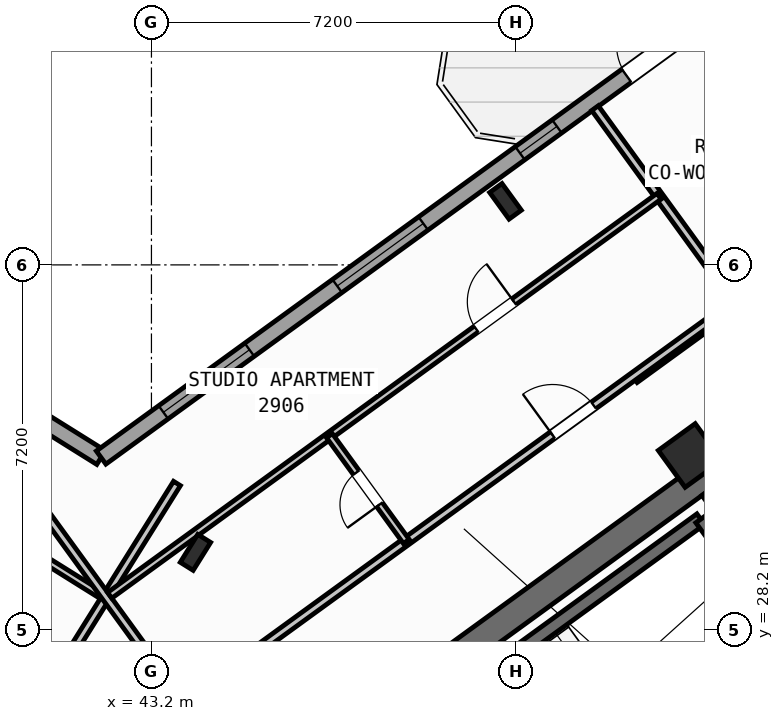
"""IFC4 building model, lengths in metres.
Left out: names, types, materials, properties, quantities, classifications, styles, units other than length and angle.
Written with IfcOpenShell. Run it as: python <this file> out.ifc"""

import sys

from ifc_helpers import new_model, si_unit, direction, frame, frame_2d, origin, origin_2d, place, context, subcontext, project, spatial, rectangle, hollow_rectangle, i_section, extrude, source, transform, mapped, element, fill, save


model = new_model("IFC4")
c1 = context("Model", 3, precision=1e-05, world=origin(), true_north=direction((0.0, 1.0)))
c2 = subcontext(c1, "Body", "Model", "MODEL_VIEW")
j1 = project(units=[si_unit("LENGTHUNIT", "METRE"), si_unit("PLANEANGLEUNIT", "RADIAN")], contexts=[c1])
p1 = place(None, origin())
s1 = spatial("IfcSite", under=j1, at=p1, CompositionType="ELEMENT")
p2 = place(p1, origin())
s2 = spatial("IfcBuilding", under=s1, at=p2, CompositionType="ELEMENT")
p3 = place(p2, frame((0.0, 0.0, 116.1)))
s3 = spatial("IfcBuildingStorey", under=s2, at=p3, CompositionType="ELEMENT", Elevation=116.1)
p4 = place(p3, frame((44.365, 24.142, 0.0), z_axis=(0.0, 0.0, 1.0), x_axis=(0.809024304885, 0.587775190107, 0.0)))
e1 = element("IfcWall", 1, at=p4, inside=s3, PredefinedType="SHEAR", context=c2, shape_type="SweptSolid", body=[
    extrude(rectangle(XDim=12.34, YDim=0.55, at=frame_2d((6.17, 0.0))), origin(), (0.0, 0.0, 1.0), 3.35),
])
p5 = place(p3, frame((58.064, 25.813, 0.0), z_axis=(0.0, 0.0, 1.0), x_axis=(-0.587764933797, 0.809031756236, 0.0)))
e2 = element("IfcWall", 2, at=p5, inside=s3, PredefinedType="SHEAR", context=c2, shape_type="SweptSolid", body=[
    extrude(rectangle(XDim=6.425, YDim=0.55, at=frame_2d((3.212, 0.0))), origin(), (0.0, 0.0, 1.0), 3.35),
])
m1 = source(origin(), c2, "Body", "SweptSolid", [
    extrude(i_section(OverallWidth=0.3, OverallDepth=0.65, WebThickness=0.016, FlangeThickness=0.031, at=origin_2d()), origin(), (0.0, 0.0, 1.0), 3.6),
])
p6 = place(p3, frame((44.068, 29.726, 0.0), z_axis=(0.0, 0.0, 1.0), x_axis=(-0.848048096156, 0.529919264233, 0.0)))
e3 = element("IfcColumn", 3, at=p6, inside=s3, PredefinedType="COLUMN", context=c2, shape_type="MappedRepresentation", body=[
    mapped(m1, transform((0.0, 0.0, 0.0), scale=1.0)),
])
m2 = source(origin(), c2, "Body", "SweptSolid", [
    extrude(hollow_rectangle(XDim=0.9, YDim=0.9, WallThickness=0.036, at=origin_2d()), origin(), (0.0, 0.0, 1.0), 3.6),
])
p7 = place(p3, frame((53.832, 31.638, 0.0), z_axis=(0.0, 0.0, 1.0), x_axis=(0.809016994375, 0.587785252292, 0.0)))
e4 = element("IfcColumn", 4, at=p7, inside=s3, PredefinedType="COLUMN", context=c2, shape_type="MappedRepresentation", body=[
    mapped(m2, transform((0.0, 0.0, 0.0), scale=1.0)),
])
p8 = place(p3, frame((50.188, 36.654, 0.0), z_axis=(0.0, 0.0, 1.0), x_axis=(0.809016994375, 0.587785252292, 0.0)))
e5 = element("IfcColumn", 5, at=p8, inside=s3, PredefinedType="COLUMN", context=c2, shape_type="MappedRepresentation", body=[
    mapped(m1, transform((0.0, 0.0, 0.0), scale=1.0)),
])
p9 = place(p3, frame((17.424, 47.083, 0.0), z_axis=(0.0, 0.0, 1.0), x_axis=(0.848049927979, -0.529916332693, 0.0)))
e6 = element("IfcWall", 6, at=p9, inside=s3, PredefinedType="STANDARD", context=c2, shape_type="SweptSolid", body=[
    extrude(rectangle(XDim=29.223, YDim=0.32, at=frame_2d((14.612, 0.0))), origin(), (0.0, 0.0, 1.0), 3.35),
])
p10 = place(p9, frame((8.839, 0.0, 0.0)))
e7 = element("IfcOpeningElement", 7, at=p10, cuts=e6, PredefinedType="OPENING", context=c2, shape_type="SweptSolid", body=[
    extrude(rectangle(XDim=1.05, YDim=2.15, at=frame_2d((0.525, 1.075))), frame((0.0, 0.17, 0.0), z_axis=(0.0, -1.0, 0.0), x_axis=(1.0, 0.0, 0.0)), (0.0, 0.0, 1.0), 0.34),
])
p11 = place(p9, frame((0.719, 0.0, 0.85)))
e8 = element("IfcOpeningElement", 8, at=p11, cuts=e6, PredefinedType="OPENING", context=c2, shape_type="SweptSolid", body=[
    extrude(rectangle(XDim=1.8, YDim=1.5, at=frame_2d((0.9, 0.75))), frame((0.0, 0.17, 0.0), z_axis=(0.0, -1.0, 0.0), x_axis=(1.0, 0.0, 0.0)), (0.0, 0.0, 1.0), 0.34),
])
p12 = place(p9, frame((3.981, 0.0, 0.85)))
e9 = element("IfcOpeningElement", 9, at=p12, cuts=e6, PredefinedType="OPENING", context=c2, shape_type="SweptSolid", body=[
    extrude(rectangle(XDim=1.5, YDim=1.5, at=frame_2d((0.75, 0.75))), frame((0.0, 0.17, 0.0), z_axis=(0.0, -1.0, 0.0), x_axis=(1.0, 0.0, 0.0)), (0.0, 0.0, 1.0), 0.34),
])
p13 = place(p9, frame((7.021, 0.0, 0.95)))
e10 = element("IfcOpeningElement", 10, at=p13, cuts=e6, PredefinedType="OPENING", context=c2, shape_type="SweptSolid", body=[
    extrude(rectangle(XDim=1.2, YDim=1.4, at=frame_2d((0.6, 0.7))), frame((0.0, 0.17, 0.0), z_axis=(0.0, -1.0, 0.0), x_axis=(1.0, 0.0, 0.0)), (0.0, 0.0, 1.0), 0.34),
])
p14 = place(p9, frame((14.471, 0.0, 0.95)))
e11 = element("IfcOpeningElement", 11, at=p14, cuts=e6, PredefinedType="OPENING", context=c2, shape_type="SweptSolid", body=[
    extrude(rectangle(XDim=1.2, YDim=1.4, at=frame_2d((0.6, 0.7))), frame((0.0, 0.17, 0.0), z_axis=(0.0, -1.0, 0.0), x_axis=(1.0, 0.0, 0.0)), (0.0, 0.0, 1.0), 0.34),
])
p15 = place(p9, frame((17.254, 0.0, 1.0)))
e12 = element("IfcOpeningElement", 12, at=p15, cuts=e6, PredefinedType="OPENING", context=c2, shape_type="SweptSolid", body=[
    extrude(rectangle(XDim=0.9, YDim=1.25, at=frame_2d((0.45, 0.625))), frame((0.0, 0.17, 0.0), z_axis=(0.0, -1.0, 0.0), x_axis=(1.0, 0.0, 0.0)), (0.0, 0.0, 1.0), 0.34),
])
p16 = place(p9, frame((20.764, 0.0, 0.8)))
e13 = element("IfcOpeningElement", 13, at=p16, cuts=e6, PredefinedType="OPENING", context=c2, shape_type="SweptSolid", body=[
    extrude(rectangle(XDim=2.1, YDim=1.55, at=frame_2d((1.05, 0.775))), frame((0.0, 0.17, 0.0), z_axis=(0.0, -1.0, 0.0), x_axis=(1.0, 0.0, 0.0)), (0.0, 0.0, 1.0), 0.34),
])
p17 = place(p9, frame((25.403, 0.0, 0.8)))
e14 = element("IfcOpeningElement", 14, at=p17, cuts=e6, PredefinedType="OPENING", context=c2, shape_type="SweptSolid", body=[
    extrude(rectangle(XDim=2.1, YDim=1.55, at=frame_2d((1.05, 0.775))), frame((0.0, 0.17, 0.0), z_axis=(0.0, -1.0, 0.0), x_axis=(1.0, 0.0, 0.0)), (0.0, 0.0, 1.0), 0.34),
])
p18 = place(p3, frame((42.207, 31.597, 0.0), z_axis=(0.0, 0.0, 1.0), x_axis=(0.809020333377, 0.587780656523, 0.0)))
e15 = element("IfcWall", 15, at=p18, inside=s3, PredefinedType="STANDARD", context=c2, shape_type="SweptSolid", body=[
    extrude(rectangle(XDim=15.223, YDim=0.32, at=frame_2d((7.611, 0.0))), origin(), (0.0, 0.0, 1.0), 3.35),
])
p19 = place(p18, frame((12.82, 0.0, 0.0)))
e16 = element("IfcOpeningElement", 16, at=p19, cuts=e15, PredefinedType="OPENING", context=c2, shape_type="SweptSolid", body=[
    extrude(rectangle(XDim=1.05, YDim=2.15, at=frame_2d((0.525, 1.075))), frame((0.0, 0.17, 0.0), z_axis=(0.0, -1.0, 0.0), x_axis=(1.0, 0.0, 0.0)), (0.0, 0.0, 1.0), 0.34),
])
p20 = place(p18, frame((1.52, 0.0, 0.8)))
e17 = element("IfcOpeningElement", 17, at=p20, cuts=e15, PredefinedType="OPENING", context=c2, shape_type="SweptSolid", body=[
    extrude(rectangle(XDim=2.1, YDim=1.55, at=frame_2d((1.05, 0.775))), frame((0.0, 0.17, 0.0), z_axis=(0.0, -1.0, 0.0), x_axis=(1.0, 0.0, 0.0)), (0.0, 0.0, 1.0), 0.34),
])
p21 = place(p18, frame((5.76, 0.0, 0.8)))
e18 = element("IfcOpeningElement", 18, at=p21, cuts=e15, PredefinedType="OPENING", context=c2, shape_type="SweptSolid", body=[
    extrude(rectangle(XDim=2.1, YDim=1.55, at=frame_2d((1.05, 0.775))), frame((0.0, 0.17, 0.0), z_axis=(0.0, -1.0, 0.0), x_axis=(1.0, 0.0, 0.0)), (0.0, 0.0, 1.0), 0.34),
])
p22 = place(p18, frame((10.219, 0.0, 1.0)))
e19 = element("IfcOpeningElement", 19, at=p22, cuts=e15, PredefinedType="OPENING", context=c2, shape_type="SweptSolid", body=[
    extrude(rectangle(XDim=0.9, YDim=1.25, at=frame_2d((0.45, 0.625))), frame((0.0, 0.17, 0.0), z_axis=(0.0, -1.0, 0.0), x_axis=(1.0, 0.0, 0.0)), (0.0, 0.0, 1.0), 0.34),
])
p23 = place(p3, frame((48.006, 25.996, 0.0), z_axis=(0.0, 0.0, 1.0), x_axis=(0.80901903764, 0.587782439969, 0.0)))
e20 = element("IfcWall", 20, at=p23, inside=s3, PredefinedType="SHEAR", context=c2, shape_type="SweptSolid", body=[
    extrude(rectangle(XDim=7.46, YDim=0.26, at=frame_2d((3.73, 0.0))), origin(), (0.0, 0.0, 1.0), 3.35),
])
p24 = place(p3, frame((55.906, 27.831, 0.0), z_axis=(0.0, 0.0, 1.0), x_axis=(-0.587804123638, 0.809003283204, 0.0)))
e21 = element("IfcWall", 21, at=p24, inside=s3, PredefinedType="SHEAR", context=c2, shape_type="SweptSolid", body=[
    extrude(rectangle(XDim=3.16, YDim=0.26, at=frame_2d((1.58, 0.0))), origin(), (0.0, 0.0, 1.0), 3.35),
])
p25 = place(p3, frame((41.936, 26.012, 0.0), z_axis=(0.0, 0.0, 1.0), x_axis=(-0.848051154596, 0.529914369676, 0.0)))
e22 = element("IfcWall", 22, at=p25, inside=s3, PredefinedType="PARTITIONING", context=c2, shape_type="SweptSolid", body=[
    extrude(rectangle(XDim=15.57, YDim=0.16, at=frame_2d((7.785, 0.0))), origin(), (0.0, 0.0, 1.0), 3.34),
])
p26 = place(p25, frame((10.83, 0.0, 0.0)))
e23 = element("IfcOpeningElement", 23, at=p26, cuts=e22, PredefinedType="OPENING", context=c2, shape_type="SweptSolid", body=[
    extrude(rectangle(XDim=1.0, YDim=2.1, at=frame_2d((0.5, 1.05))), frame((0.0, 0.09, 0.0), z_axis=(0.0, -1.0, 0.0), x_axis=(1.0, 0.0, 0.0)), (0.0, 0.0, 1.0), 0.18),
])
p27 = place(p3, frame((43.704, 31.086, 0.0), z_axis=(0.0, 0.0, 1.0), x_axis=(-0.529906828443, -0.848055866774, 0.0)))
e24 = element("IfcWall", 24, at=p27, inside=s3, PredefinedType="PARTITIONING", context=c2, shape_type="SweptSolid", body=[
    extrude(rectangle(XDim=5.48, YDim=0.16, at=frame_2d((2.74, 0.0))), origin(), (0.0, 0.0, 1.0), 3.34),
])
p28 = place(p3, frame((42.226, 28.873, 0.0), z_axis=(0.0, 0.0, 1.0), x_axis=(-0.848049134363, 0.529917602752, 0.0)))
e25 = element("IfcWall", 25, at=p28, inside=s3, PredefinedType="PLUMBINGWALL", context=c2, shape_type="SweptSolid", body=[
    extrude(rectangle(XDim=14.3, YDim=0.14, at=frame_2d((7.15, 0.0))), origin(), (0.0, 0.0, 1.0), 3.34),
])
p29 = place(p28, frame((9.57, 0.0, 0.0)))
e26 = element("IfcOpeningElement", 26, at=p29, cuts=e25, PredefinedType="OPENING", context=c2, shape_type="SweptSolid", body=[
    extrude(rectangle(XDim=0.92, YDim=2.08, at=frame_2d((0.46, 1.04))), frame((0.0, 0.08, 0.0), z_axis=(0.0, -1.0, 0.0), x_axis=(1.0, 0.0, 0.0)), (0.0, 0.0, 1.0), 0.16),
])
p30 = place(p3, frame((52.739, 33.143, 0.0), z_axis=(0.0, 0.0, 1.0), x_axis=(0.809000999347, 0.58780726693, 0.0)))
e27 = element("IfcWall", 27, at=p30, inside=s3, PredefinedType="PARTITIONING", context=c2, shape_type="SweptSolid", body=[
    extrude(rectangle(XDim=2.51, YDim=0.16, at=frame_2d((1.255, 0.0))), origin(), (0.0, 0.0, 1.0), 3.34),
])
p31 = place(p3, frame((60.829, 26.278, 0.0), z_axis=(0.0, 0.0, 1.0), x_axis=(-0.587777474174, 0.809022645451, 0.0)))
e28 = element("IfcWall", 28, at=p31, inside=s3, PredefinedType="PARTITIONING", context=c2, shape_type="SweptSolid", body=[
    extrude(rectangle(XDim=15.1, YDim=0.16, at=frame_2d((7.55, 0.0))), origin(), (0.0, 0.0, 1.0), 3.34),
])
p32 = place(p3, frame((42.866, 26.044, 0.0), z_axis=(0.0, 0.0, 1.0), x_axis=(0.809020254154, 0.587780765566, 0.0)))
e29 = element("IfcWall", 29, at=p32, inside=s3, PredefinedType="PARTITIONING", context=c2, shape_type="SweptSolid", body=[
    extrude(rectangle(XDim=14.67, YDim=0.16, at=frame_2d((7.335, 0.0))), origin(), (0.0, 0.0, 1.0), 3.34),
])
p33 = place(p32, frame((10.2, 0.0, 0.0)))
e30 = element("IfcOpeningElement", 30, at=p33, cuts=e29, PredefinedType="OPENING", context=c2, shape_type="SweptSolid", body=[
    extrude(rectangle(XDim=1.0, YDim=2.1, at=frame_2d((0.5, 1.05))), frame((0.0, 0.09, 0.0), z_axis=(0.0, -1.0, 0.0), x_axis=(1.0, 0.0, 0.0)), (0.0, 0.0, 1.0), 0.18),
])
p34 = place(p3, frame((43.969, 26.55, 0.0), z_axis=(0.0, 0.0, 1.0), x_axis=(-0.587776919386, 0.80902304852, 0.0)))
e31 = element("IfcWall", 31, at=p34, inside=s3, PredefinedType="PARTITIONING", context=c2, shape_type="SweptSolid", body=[
    extrude(rectangle(XDim=5.48, YDim=0.16, at=frame_2d((2.74, 0.0))), origin(), (0.0, 0.0, 1.0), 3.34),
])
p35 = place(p3, frame((42.377, 28.878, 0.0), z_axis=(0.0, 0.0, 1.0), x_axis=(0.809020411523, 0.587780548963, 0.0)))
e32 = element("IfcWall", 32, at=p35, inside=s3, PredefinedType="PLUMBINGWALL", context=c2, shape_type="SweptSolid", body=[
    extrude(rectangle(XDim=13.4, YDim=0.14, at=frame_2d((6.7, 0.0))), origin(), (0.0, 0.0, 1.0), 3.34),
])
p36 = place(p35, frame((8.94, 0.0, 0.0)))
e33 = element("IfcOpeningElement", 33, at=p36, cuts=e32, PredefinedType="OPENING", context=c2, shape_type="SweptSolid", body=[
    extrude(rectangle(XDim=0.92, YDim=2.08, at=frame_2d((0.46, 1.04))), frame((0.0, 0.08, 0.0), z_axis=(0.0, -1.0, 0.0), x_axis=(1.0, 0.0, 0.0)), (0.0, 0.0, 1.0), 0.16),
])
p37 = place(p3, frame((48.229, 29.941, 0.0), z_axis=(0.0, 0.0, 1.0), x_axis=(-0.587772116736, 0.809026537752, 0.0)))
e34 = element("IfcWall", 34, at=p37, inside=s3, PredefinedType="PLUMBINGWALL", context=c2, shape_type="SweptSolid", body=[
    extrude(rectangle(XDim=2.58, YDim=0.14, at=frame_2d((1.29, 0.0))), origin(), (0.0, 0.0, 1.0), 3.34),
])
p38 = place(p37, frame((0.9, 0.0, 0.0)))
e35 = element("IfcOpeningElement", 35, at=p38, cuts=e34, PredefinedType="OPENING", context=c2, shape_type="SweptSolid", body=[
    extrude(rectangle(XDim=0.78, YDim=2.05, at=frame_2d((0.39, 1.025))), frame((0.0, 0.08, 0.0), z_axis=(0.0, -1.0, 0.0), x_axis=(1.0, 0.0, 0.0)), (0.0, 0.0, 1.0), 0.16),
])
m3 = source(origin(), c2, "Body", "SweptSolid", [
    extrude(rectangle(XDim=1.05, YDim=2.15, at=frame_2d((0.525, 1.075))), frame((0.0, 0.025, 0.0), z_axis=(0.0, -1.0, 0.0), x_axis=(1.0, 0.0, 0.0)), (0.0, 0.0, 1.0), 0.05),
])
p39 = place(p19, origin())
e36 = element("IfcDoor", 36, at=p39, inside=s3, OperationType="SINGLE_SWING_RIGHT", PredefinedType="DOOR", context=c2, shape_type="MappedRepresentation", body=[
    mapped(m3, transform((0.0, 0.0, 0.0), scale=1.0)),
])
fill(e16, e36)
m4 = source(origin(), c2, "Body", "SweptSolid", [
    extrude(rectangle(XDim=2.1, YDim=1.55, at=frame_2d((1.05, 0.775))), frame((0.0, 0.03, 0.0), z_axis=(0.0, -1.0, 0.0), x_axis=(1.0, 0.0, 0.0)), (0.0, 0.0, 1.0), 0.06),
])
p40 = place(p20, origin())
e37 = element("IfcWindow", 37, at=p40, inside=s3, PartitioningType="SINGLE_PANEL", PredefinedType="WINDOW", context=c2, shape_type="MappedRepresentation", body=[
    mapped(m4, transform((0.0, 0.0, 0.0), scale=1.0)),
])
fill(e17, e37)
p41 = place(p21, origin())
e38 = element("IfcWindow", 38, at=p41, inside=s3, PartitioningType="SINGLE_PANEL", PredefinedType="WINDOW", context=c2, shape_type="MappedRepresentation", body=[
    mapped(m4, transform((0.0, 0.0, 0.0), scale=1.0)),
])
fill(e18, e38)
m5 = source(origin(), c2, "Body", "SweptSolid", [
    extrude(rectangle(XDim=0.9, YDim=1.25, at=frame_2d((0.45, 0.625))), frame((0.0, 0.03, 0.0), z_axis=(0.0, -1.0, 0.0), x_axis=(1.0, 0.0, 0.0)), (0.0, 0.0, 1.0), 0.06),
])
p42 = place(p22, origin())
e39 = element("IfcWindow", 39, at=p42, inside=s3, PartitioningType="SINGLE_PANEL", PredefinedType="WINDOW", context=c2, shape_type="MappedRepresentation", body=[
    mapped(m5, transform((0.0, 0.0, 0.0), scale=1.0)),
])
fill(e19, e39)
m6 = source(origin(), c2, "Body", "SweptSolid", [
    extrude(rectangle(XDim=1.0, YDim=2.1, at=frame_2d((0.5, 1.05))), frame((0.0, 0.025, 0.0), z_axis=(0.0, -1.0, 0.0), x_axis=(1.0, 0.0, 0.0)), (0.0, 0.0, 1.0), 0.05),
])
p43 = place(p33, origin())
e40 = element("IfcDoor", 40, at=p43, inside=s3, OperationType="SINGLE_SWING_LEFT", PredefinedType="DOOR", context=c2, shape_type="MappedRepresentation", body=[
    mapped(m6, transform((0.0, 0.0, 0.0), scale=1.0)),
])
fill(e30, e40)
m7 = source(origin(), c2, "Body", "SweptSolid", [
    extrude(rectangle(XDim=0.92, YDim=2.08, at=frame_2d((0.46, 1.04))), frame((0.0, 0.025, 0.0), z_axis=(0.0, -1.0, 0.0), x_axis=(1.0, 0.0, 0.0)), (0.0, 0.0, 1.0), 0.05),
])
p44 = place(p36, origin())
e41 = element("IfcDoor", 41, at=p44, inside=s3, OperationType="SINGLE_SWING_RIGHT", PredefinedType="DOOR", context=c2, shape_type="MappedRepresentation", body=[
    mapped(m7, transform((0.0, 0.0, 0.0), scale=1.0)),
])
fill(e33, e41)
m8 = source(origin(), c2, "Body", "SweptSolid", [
    extrude(rectangle(XDim=0.78, YDim=2.05, at=frame_2d((0.39, 1.025))), frame((0.0, 0.025, 0.0), z_axis=(0.0, -1.0, 0.0), x_axis=(1.0, 0.0, 0.0)), (0.0, 0.0, 1.0), 0.05),
])
p45 = place(p38, origin())
e42 = element("IfcDoor", 42, at=p45, inside=s3, OperationType="SINGLE_SWING_LEFT", PredefinedType="DOOR", context=c2, shape_type="MappedRepresentation", body=[
    mapped(m8, transform((0.0, 0.0, 0.0), scale=1.0)),
])
fill(e35, e42)
save(model, sys.argv[1])
